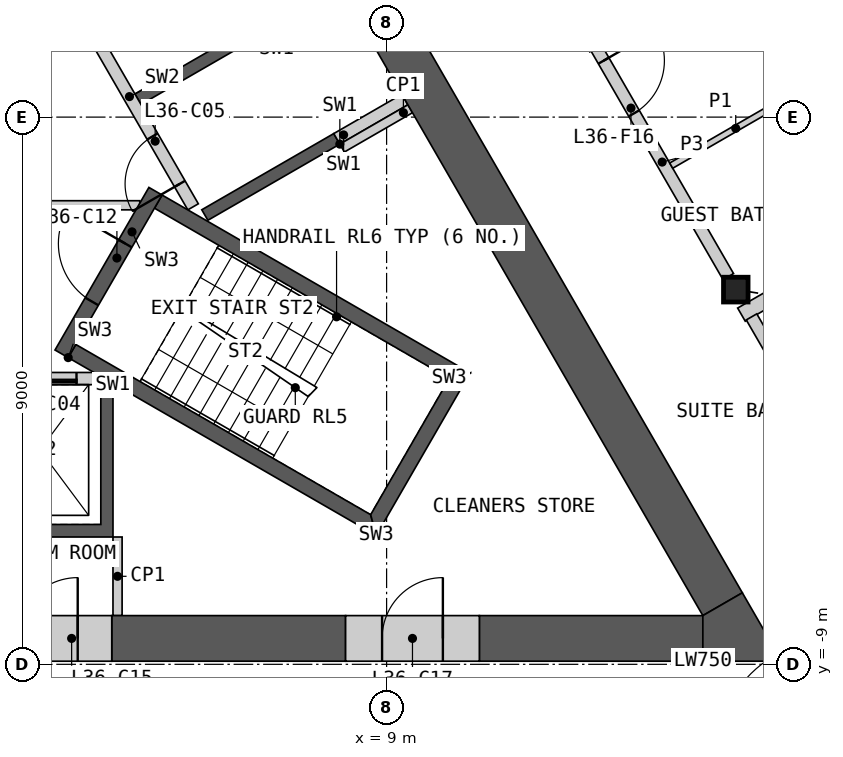
"""IFC4 building model, lengths in metres.
Left out: names, types, materials, properties, quantities, classifications, styles, units other than length and angle.
Written with IfcOpenShell. Run it as: python <this file> out.ifc"""

import sys

from ifc_helpers import new_model, si_unit, direction, frame, frame_2d, origin, origin_2d, place, context, subcontext, project, spatial, polyline, rectangle, i_section, outline, extrude, element, fill, save


model = new_model("IFC4")
c1 = context("Model", 3, precision=1e-05, world=origin(), true_north=direction((0.0, 1.0)))
c2 = subcontext(c1, "Body", "Model", "MODEL_VIEW")
j1 = project(units=[si_unit("LENGTHUNIT", "METRE"), si_unit("PLANEANGLEUNIT", "RADIAN")], contexts=[c1])
p1 = place(None, origin())
s1 = spatial("IfcSite", under=j1, at=p1, CompositionType="ELEMENT")
p2 = place(p1, origin())
s2 = spatial("IfcBuilding", under=s1, at=p2, CompositionType="ELEMENT")
p3 = place(p2, frame((0.0, 0.0, 172.8)))
s3 = spatial("IfcBuildingStorey", under=s2, at=p3, CompositionType="ELEMENT", Elevation=172.8)
p4 = place(p3, frame((14.743, -2.837, 0.0), z_axis=(0.0, 0.0, 1.0), x_axis=(1.0, 0.0, 0.0)))
e1 = element("IfcColumn", 1, at=p4, inside=s3, PredefinedType="COLUMN", context=c2, shape_type="SweptSolid", body=[
    extrude(i_section(OverallWidth=0.404, OverallDepth=0.407, WebThickness=0.027, FlangeThickness=0.044, at=origin_2d()), origin(), (0.0, 0.0, 1.0), 3.6),
])
p5 = place(p3, origin())
e2 = element("IfcWall", 2, at=p5, inside=s3, PredefinedType="SHEAR", context=c2, shape_type="SweptSolid", body=[
    extrude(outline(polyline([(4.5, -4.4), (4.5, -6.906), (2.1, -6.906), (2.1, -4.4), (2.3, -4.4), (2.3, -6.7), (4.3, -6.7), (4.3, -4.4), (4.5, -4.4)])), origin(), (0.0, 0.0, 1.0), 3.25),
])
p6 = place(p3, frame((-4.187, -4.3, 0.0), z_axis=(0.0, 0.0, 1.0), x_axis=(1.0, 0.0, 0.0)))
e3 = element("IfcWall", 3, at=p6, inside=s3, PredefinedType="SOLIDWALL", context=c2, shape_type="SweptSolid", body=[
    extrude(rectangle(XDim=8.373, YDim=0.2, at=frame_2d((4.187, 0.0))), origin(), (0.0, 0.0, 1.0), 3.25),
])
p7 = place(p6, frame((0.287, 0.0, 0.0)))
e4 = element("IfcOpeningElement", 4, at=p7, cuts=e3, PredefinedType="OPENING", context=c2, shape_type="SweptSolid", body=[
    extrude(rectangle(XDim=1.2, YDim=2.1, at=frame_2d((0.6, 1.05))), frame((0.0, 0.11, 0.0), z_axis=(0.0, -1.0, 0.0), x_axis=(1.0, 0.0, 0.0)), (0.0, 0.0, 1.0), 0.22),
])
p8 = place(p6, frame((2.387, 0.0, 0.0)))
e5 = element("IfcOpeningElement", 5, at=p8, cuts=e3, PredefinedType="OPENING", context=c2, shape_type="SweptSolid", body=[
    extrude(rectangle(XDim=1.4, YDim=2.1, at=frame_2d((0.7, 1.05))), frame((0.0, 0.11, 0.0), z_axis=(0.0, -1.0, 0.0), x_axis=(1.0, 0.0, 0.0)), (0.0, 0.0, 1.0), 0.22),
])
p9 = place(p6, frame((4.837, 0.0, 0.0)))
e6 = element("IfcOpeningElement", 6, at=p9, cuts=e3, PredefinedType="OPENING", context=c2, shape_type="SweptSolid", body=[
    extrude(rectangle(XDim=0.9, YDim=2.1, at=frame_2d((0.45, 1.05))), frame((0.0, 0.11, 0.0), z_axis=(0.0, -1.0, 0.0), x_axis=(1.0, 0.0, 0.0)), (0.0, 0.0, 1.0), 0.22),
])
p10 = place(p6, frame((6.887, 0.0, 0.0)))
e7 = element("IfcOpeningElement", 7, at=p10, cuts=e3, PredefinedType="OPENING", context=c2, shape_type="SweptSolid", body=[
    extrude(rectangle(XDim=1.2, YDim=2.1, at=frame_2d((0.6, 1.05))), frame((0.0, 0.11, 0.0), z_axis=(0.0, -1.0, 0.0), x_axis=(1.0, 0.0, 0.0)), (0.0, 0.0, 1.0), 0.22),
])
p11 = place(p3, origin())
e8 = element("IfcWall", 8, at=p11, inside=s3, PredefinedType="SHEAR", context=c2, shape_type="SweptSolid", body=[
    extrude(outline(polyline([(1.561, 6.097), (3.731, 7.35), (7.131, 1.461), (4.96, 0.208), (4.861, 0.381), (6.852, 1.531), (4.752, 5.169), (2.76, 4.019), (2.66, 4.192), (4.652, 5.342), (3.652, 7.074), (1.66, 5.924), (1.561, 6.097)])), origin(), (0.0, 0.0, 1.0), 3.25),
])
p12 = place(p3, origin())
e9 = element("IfcWall", 9, at=p12, inside=s3, PredefinedType="SHEAR", context=c2, shape_type="SweptSolid", body=[
    extrude(outline(polyline([(8.231, -0.444), (6.061, -1.697), (5.96, -1.524), (8.131, -0.271), (8.231, -0.444)])), origin(), (0.0, 0.0, 1.0), 3.25),
])
p13 = place(p3, frame((5.817, -1.476, 0.0), z_axis=(0.0, 0.0, 1.0), x_axis=(-0.500002616675, 0.866023893041, 0.0)))
e10 = element("IfcWall", 10, at=p13, inside=s3, PredefinedType="SOLIDWALL", context=c2, shape_type="SweptSolid", body=[
    extrude(rectangle(XDim=8.373, YDim=0.2, at=frame_2d((4.187, 0.0))), origin(), (0.0, 0.0, 1.0), 3.25),
])
p14 = place(p13, frame((0.437, 0.0, 0.0)))
e11 = element("IfcOpeningElement", 11, at=p14, cuts=e10, PredefinedType="OPENING", context=c2, shape_type="SweptSolid", body=[
    extrude(rectangle(XDim=0.9, YDim=2.1, at=frame_2d((0.45, 1.05))), frame((0.0, 0.11, 0.0), z_axis=(0.0, -1.0, 0.0), x_axis=(1.0, 0.0, 0.0)), (0.0, 0.0, 1.0), 0.22),
])
p15 = place(p13, frame((3.737, 0.0, 0.0)))
e12 = element("IfcOpeningElement", 12, at=p15, cuts=e10, PredefinedType="OPENING", context=c2, shape_type="SweptSolid", body=[
    extrude(rectangle(XDim=0.9, YDim=2.1, at=frame_2d((0.45, 1.05))), frame((0.0, 0.11, 0.0), z_axis=(0.0, -1.0, 0.0), x_axis=(1.0, 0.0, 0.0)), (0.0, 0.0, 1.0), 0.22),
])
p16 = place(p13, frame((6.937, 0.0, 0.0)))
e13 = element("IfcOpeningElement", 13, at=p16, cuts=e10, PredefinedType="OPENING", context=c2, shape_type="SweptSolid", body=[
    extrude(rectangle(XDim=1.1, YDim=2.1, at=frame_2d((0.55, 1.05))), frame((0.0, 0.11, 0.0), z_axis=(0.0, -1.0, 0.0), x_axis=(1.0, 0.0, 0.0)), (0.0, 0.0, 1.0), 0.22),
])
p17 = place(p3, frame((8.181, -0.357, 0.0), z_axis=(0.0, 0.0, 1.0), x_axis=(0.866003189247, 0.500038474733, 0.0)))
e14 = element("IfcWall", 14, at=p17, inside=s3, PredefinedType="SHEAR", context=c2, shape_type="SweptSolid", body=[
    extrude(rectangle(XDim=1.293, YDim=0.2, at=frame_2d((0.646, 0.0))), origin(), (0.0, 0.0, 1.0), 3.25),
])
p18 = place(p3, frame((-4.941, -1.45, 0.0), z_axis=(0.0, 0.0, 1.0), x_axis=(1.0, 0.0, 0.0)))
e15 = element("IfcWall", 15, at=p18, inside=s3, PredefinedType="PARTITIONING", context=c2, shape_type="SweptSolid", body=[
    extrude(rectangle(XDim=9.882, YDim=0.15, at=frame_2d((4.941, 0.0))), origin(), (0.0, 0.0, 1.0), 3.25),
])
p19 = place(p18, frame((4.391, 0.0, 0.0)))
e16 = element("IfcOpeningElement", 16, at=p19, cuts=e15, PredefinedType="OPENING", context=c2, shape_type="SweptSolid", body=[
    extrude(rectangle(XDim=1.1, YDim=2.1, at=frame_2d((0.55, 1.05))), frame((0.0, 0.085, 0.0), z_axis=(0.0, -1.0, 0.0), x_axis=(1.0, 0.0, 0.0)), (0.0, 0.0, 1.0), 0.17),
])
p20 = place(p3, origin())
e17 = element("IfcWall", 17, at=p20, inside=s3, PredefinedType="SHEAR", context=c2, shape_type="SweptSolid", body=[
    extrude(outline(polyline([(3.763, -3.956), (8.83, -6.881), (8.738, -6.539), (3.888, -3.739), (3.763, -3.956)])), origin(), (0.0, 0.0, 1.0), 3.25),
])
p21 = place(p3, origin())
e18 = element("IfcWall", 18, at=p21, inside=s3, PredefinedType="SHEAR", context=c2, shape_type="SweptSolid", body=[
    extrude(outline(polyline([(8.83, -6.881), (10.374, -4.206), (10.032, -4.298), (8.738, -6.539), (8.83, -6.881)])), origin(), (0.0, 0.0, 1.0), 3.25),
])
p22 = place(p3, origin())
e19 = element("IfcWall", 19, at=p22, inside=s3, PredefinedType="SHEAR", context=c2, shape_type="SweptSolid", body=[
    extrude(outline(polyline([(10.032, -4.298), (10.374, -4.206), (5.307, -1.281), (5.182, -1.498), (10.032, -4.298)])), origin(), (0.0, 0.0, 1.0), 3.25),
])
p23 = place(p3, frame((3.655, -3.893, 0.0), z_axis=(0.0, 0.0, 1.0), x_axis=(0.499982516597, 0.866035497597, 0.0)))
e20 = element("IfcWall", 20, at=p23, inside=s3, PredefinedType="SHEAR", context=c2, shape_type="SweptSolid", body=[
    extrude(rectangle(XDim=3.088, YDim=0.25, at=frame_2d((1.544, 0.0))), origin(), (0.0, 0.0, 1.0), 3.25),
])
p24 = place(p23, frame((0.994, 0.0, 0.0)))
e21 = element("IfcOpeningElement", 21, at=p24, cuts=e20, PredefinedType="OPENING", context=c2, shape_type="SweptSolid", body=[
    extrude(rectangle(XDim=1.1, YDim=2.1, at=frame_2d((0.55, 1.05))), frame((0.0, 0.135, 0.0), z_axis=(0.0, -1.0, 0.0), x_axis=(1.0, 0.0, 0.0)), (0.0, 0.0, 1.0), 0.27),
])
for number, where, z_axis, x_axis in (
    (22, (4.575, -6.906, 0.0), (0.0, 0.0, 1.0), (0.0, -1.0, 0.0)),
    (23, (8.268, -0.509, 0.0), (0.0, 0.0, 1.0), (0.866, 0.5, 0.0)),
):
    element("IfcWall", number, at=place(p3, frame(where, z_axis=z_axis, x_axis=x_axis)), inside=s3, PredefinedType="PARTITIONING", context=c2, shape_type="SweptSolid", body=[
        extrude(rectangle(XDim=1.293, YDim=0.15, at=frame_2d((0.646, 0.0))), origin(), (0.0, 0.0, 1.0), 3.25),
    ])
p25 = place(p3, frame((4.48, -8.574, 0.0), z_axis=(0.0, 0.0, 1.0), x_axis=(1.0, 0.0, 0.0)))
e24 = element("IfcWall", 24, at=p25, inside=s3, PredefinedType="SHEAR", context=c2, shape_type="SweptSolid", body=[
    extrude(rectangle(XDim=3.845, YDim=0.75, at=frame_2d((1.923, 0.0))), origin(), (0.0, 0.0, 1.0), 3.25),
])
p26 = place(p3, frame((10.525, -8.574, 0.0), z_axis=(0.0, 0.0, 1.0), x_axis=(1.0, 0.0, 0.0)))
e25 = element("IfcWall", 25, at=p26, inside=s3, PredefinedType="SHEAR", context=c2, shape_type="SweptSolid", body=[
    extrude(rectangle(XDim=3.676, YDim=0.75, at=frame_2d((1.838, 0.0))), origin(), (0.0, 0.0, 1.0), 3.25),
])
p27 = place(p3, frame((14.526, -8.011, 0.0), z_axis=(0.0, 0.0, 1.0), x_axis=(-0.499994855372, 0.866028374016, 0.0)))
e26 = element("IfcWall", 26, at=p27, inside=s3, PredefinedType="SHEAR", context=c2, shape_type="SweptSolid", body=[
    extrude(rectangle(XDim=14.301, YDim=0.75, at=frame_2d((7.15, 0.0))), origin(), (0.0, 0.0, 1.0), 3.25),
])
p28 = place(p3, origin())
e27 = element("IfcWall", 27, at=p28, inside=s3, PredefinedType="SHEAR", context=c2, shape_type="SweptSolid", body=[
    extrude(outline(polyline([(14.201, -8.949), (14.201, -8.199), (14.851, -7.824), (15.5, -8.949), (14.201, -8.949)])), origin(), (0.0, 0.0, 1.0), 3.25),
])
p29 = place(p3, frame((2.32, -8.574, 0.0), z_axis=(0.0, 0.0, 1.0), x_axis=(1.0, 0.0, 0.0)))
e28 = element("IfcWall", 28, at=p29, inside=s3, PredefinedType="SHEAR", context=c2, shape_type="SweptSolid", body=[
    extrude(rectangle(XDim=2.16, YDim=0.75, at=frame_2d((1.08, 0.0))), origin(), (0.0, 0.0, 1.0), 3.25),
])
p30 = place(p29, frame((0.6, 0.0, 0.0)))
e29 = element("IfcOpeningElement", 29, at=p30, cuts=e28, PredefinedType="OPENING", context=c2, shape_type="SweptSolid", body=[
    extrude(rectangle(XDim=1.0, YDim=2.1, at=frame_2d((0.5, 1.05))), frame((0.0, 0.385, 0.0), z_axis=(0.0, -1.0, 0.0), x_axis=(1.0, 0.0, 0.0)), (0.0, 0.0, 1.0), 0.77),
])
p31 = place(p3, frame((8.325, -8.574, 0.0), z_axis=(0.0, 0.0, 1.0), x_axis=(1.0, 0.0, 0.0)))
e30 = element("IfcWall", 30, at=p31, inside=s3, PredefinedType="SHEAR", context=c2, shape_type="SweptSolid", body=[
    extrude(rectangle(XDim=2.2, YDim=0.75, at=frame_2d((1.1, 0.0))), origin(), (0.0, 0.0, 1.0), 3.25),
])
p32 = place(p31, frame((0.6, 0.0, 0.0)))
e31 = element("IfcOpeningElement", 31, at=p32, cuts=e30, PredefinedType="OPENING", context=c2, shape_type="SweptSolid", body=[
    extrude(rectangle(XDim=1.0, YDim=2.1, at=frame_2d((0.5, 1.05))), frame((0.0, 0.385, 0.0), z_axis=(0.0, -1.0, 0.0), x_axis=(1.0, 0.0, 0.0)), (0.0, 0.0, 1.0), 0.77),
])
p33 = place(p3, frame((14.836, -3.249, 0.0), z_axis=(0.0, 0.0, 1.0), x_axis=(0.866022412254, 0.500005181446, 0.0)))
e32 = element("IfcWall", 32, at=p33, inside=s3, PredefinedType="PARTITIONING", context=c2, shape_type="SweptSolid", body=[
    extrude(rectangle(XDim=13.081, YDim=0.25, at=frame_2d((6.541, 0.0))), origin(), (0.0, 0.0, 1.0), 2.404),
])
p34 = place(p3, frame((15.002, -3.286, 0.0), z_axis=(0.0, 0.0, 1.0), x_axis=(0.500007607708, -0.866021011428, 0.0)))
e33 = element("IfcWall", 33, at=p34, inside=s3, PredefinedType="PARTITIONING", context=c2, shape_type="SweptSolid", body=[
    extrude(rectangle(XDim=5.484, YDim=0.2, at=frame_2d((2.742, 0.0))), origin(), (0.0, 0.0, 1.0), 3.25),
])
p35 = place(p34, frame((4.032, 0.0, 0.0)))
e34 = element("IfcOpeningElement", 34, at=p35, cuts=e33, PredefinedType="OPENING", context=c2, shape_type="SweptSolid", body=[
    extrude(rectangle(XDim=1.1, YDim=2.1, at=frame_2d((0.55, 1.05))), frame((0.0, 0.11, 0.0), z_axis=(0.0, -1.0, 0.0), x_axis=(1.0, 0.0, 0.0)), (0.0, 0.0, 1.0), 0.22),
])
p36 = place(p3, frame((12.444, 1.145, 0.0), z_axis=(0.0, 0.0, 1.0), x_axis=(0.500007404367, -0.866021128829, 0.0)))
e35 = element("IfcWall", 35, at=p36, inside=s3, PredefinedType="PARTITIONING", context=c2, shape_type="SweptSolid", body=[
    extrude(rectangle(XDim=4.351, YDim=0.2, at=frame_2d((2.176, 0.0))), origin(), (0.0, 0.0, 1.0), 3.25),
])
p37 = place(p36, frame((0.25, 0.0, 0.0)))
e36 = element("IfcOpeningElement", 36, at=p37, cuts=e35, PredefinedType="OPENING", context=c2, shape_type="SweptSolid", body=[
    extrude(rectangle(XDim=1.0, YDim=2.1, at=frame_2d((0.5, 1.05))), frame((0.0, 0.11, 0.0), z_axis=(0.0, -1.0, 0.0), x_axis=(1.0, 0.0, 0.0)), (0.0, 0.0, 1.0), 0.22),
])
p38 = place(p3, frame((13.681, -0.798, 0.0), z_axis=(0.0, 0.0, 1.0), x_axis=(0.866032905446, 0.499987006516, 0.0)))
e37 = element("IfcWall", 37, at=p38, inside=s3, PredefinedType="PARTITIONING", context=c2, shape_type="SweptSolid", body=[
    extrude(rectangle(XDim=2.45, YDim=0.1, at=frame_2d((1.225, 0.0))), origin(), (0.0, 0.0, 1.0), 2.404),
])
p39 = place(p10, origin())
e38 = element("IfcDoor", 38, at=p39, inside=s3, OperationType="SLIDING_TO_LEFT", PredefinedType="DOOR", context=c2, shape_type="SweptSolid", body=[
    extrude(rectangle(XDim=1.2, YDim=2.1, at=frame_2d((0.6, 1.05))), frame((0.0, 0.025, 0.0), z_axis=(0.0, -1.0, 0.0), x_axis=(1.0, 0.0, 0.0)), (0.0, 0.0, 1.0), 0.05),
])
fill(e7, e38)
p40 = place(p14, origin())
e39 = element("IfcDoor", 39, at=p40, inside=s3, OperationType="SINGLE_SWING_LEFT", PredefinedType="DOOR", context=c2, shape_type="SweptSolid", body=[
    extrude(rectangle(XDim=0.9, YDim=2.1, at=frame_2d((0.45, 1.05))), frame((0.0, 0.025, 0.0), z_axis=(0.0, -1.0, 0.0), x_axis=(1.0, 0.0, 0.0)), (0.0, 0.0, 1.0), 0.05),
])
fill(e11, e39)
p41 = place(p24, origin())
e40 = element("IfcDoor", 40, at=p41, inside=s3, OperationType="SINGLE_SWING_RIGHT", PredefinedType="DOOR", context=c2, shape_type="SweptSolid", body=[
    extrude(rectangle(XDim=1.1, YDim=2.1, at=frame_2d((0.55, 1.05))), frame((0.0, 0.025, 0.0), z_axis=(0.0, -1.0, 0.0), x_axis=(1.0, 0.0, 0.0)), (0.0, 0.0, 1.0), 0.05),
])
fill(e21, e40)
p42 = place(p30, origin())
e41 = element("IfcDoor", 41, at=p42, inside=s3, OperationType="SINGLE_SWING_RIGHT", PredefinedType="DOOR", context=c2, shape_type="SweptSolid", body=[
    extrude(rectangle(XDim=1.0, YDim=2.1, at=frame_2d((0.5, 1.05))), frame((0.0, 0.13, 0.0), z_axis=(0.0, -1.0, 0.0), x_axis=(1.0, 0.0, 0.0)), (0.0, 0.0, 1.0), 0.05),
])
fill(e29, e41)
p43 = place(p32, origin())
e42 = element("IfcDoor", 42, at=p43, inside=s3, OperationType="SINGLE_SWING_RIGHT", PredefinedType="DOOR", context=c2, shape_type="SweptSolid", body=[
    extrude(rectangle(XDim=1.0, YDim=2.1, at=frame_2d((0.5, 1.05))), frame((0.0, 0.13, 0.0), z_axis=(0.0, -1.0, 0.0), x_axis=(1.0, 0.0, 0.0)), (0.0, 0.0, 1.0), 0.05),
])
fill(e31, e42)
p44 = place(p37, origin())
e43 = element("IfcDoor", 43, at=p44, inside=s3, OperationType="SINGLE_SWING_LEFT", PredefinedType="DOOR", context=c2, shape_type="SweptSolid", body=[
    extrude(rectangle(XDim=1.0, YDim=2.1, at=frame_2d((0.5, 1.05))), frame((0.0, 0.025, 0.0), z_axis=(0.0, -1.0, 0.0), x_axis=(1.0, 0.0, 0.0)), (0.0, 0.0, 1.0), 0.05),
])
fill(e36, e43)
save(model, sys.argv[1])
